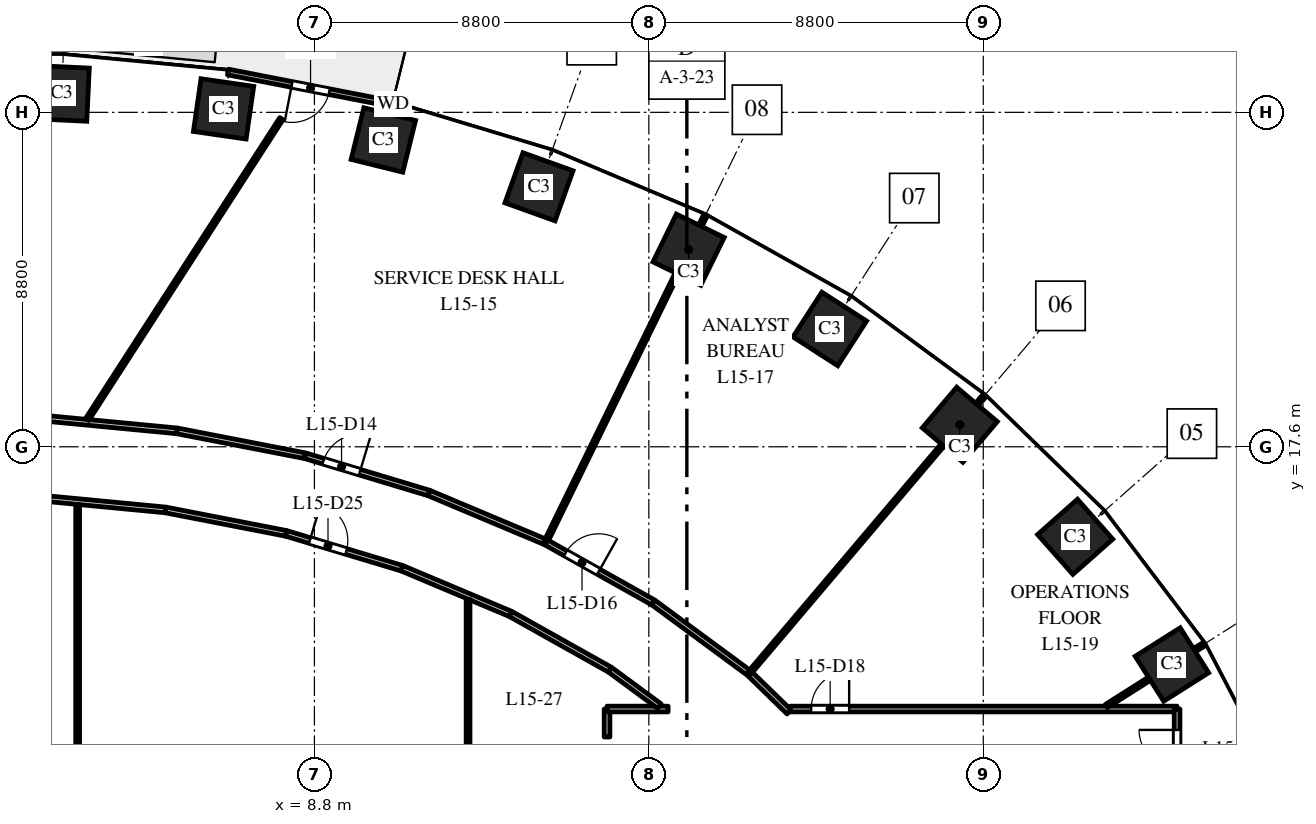
"""IFC4 building model, lengths in metres.
Left out: names, types, materials, properties, quantities, classifications, styles, units other than length and angle.
Written with IfcOpenShell. Run it as: python <this file> out.ifc"""

import sys

from ifc_helpers import new_model, si_unit, direction, frame, frame_2d, origin, origin_2d, place, context, subcontext, project, spatial, rectangle, extrude, element, fill, save


model = new_model("IFC4")
c1 = context("Model", 3, precision=1e-05, world=origin(), true_north=direction((0.0, 1.0)))
c2 = subcontext(c1, "Body", "Model", "MODEL_VIEW")
j1 = project(units=[si_unit("LENGTHUNIT", "METRE"), si_unit("PLANEANGLEUNIT", "RADIAN")], contexts=[c1])
p1 = place(None, origin())
s1 = spatial("IfcSite", under=j1, at=p1, CompositionType="ELEMENT")
p2 = place(p1, origin())
s2 = spatial("IfcBuilding", under=s1, at=p2, CompositionType="ELEMENT")
p3 = place(p2, frame((0.0, 0.0, 70.5)))
s3 = spatial("IfcBuildingStorey", under=s2, at=p3, CompositionType="ELEMENT", Elevation=70.5)
for number, where, z_axis, x_axis in (
    (1, (31.365, 11.871, 0.0), (0.0, 0.0, 1.0), (-0.535, 0.845, 0.0)),
    (2, (28.819, 15.23, 0.0), (0.0, 0.0, 1.0), (-0.663, 0.749, 0.0)),
    (3, (25.783, 18.18, 0.0), (0.0, 0.0, 1.0), (-0.763, 0.646, 0.0)),
    (4, (22.362, 20.7, 0.0), (0.0, 0.0, 1.0), (-0.84, 0.542, 0.0)),
    (5, (18.646, 22.785, 0.0), (0.0, 0.0, 1.0), (-0.898, 0.439, 0.0)),
    (6, (14.709, 24.441, 0.0), (0.0, 0.0, 1.0), (-0.941, 0.338, 0.0)),
    (7, (10.613, 25.674, 0.0), (0.0, 0.0, 1.0), (-0.971, 0.24, 0.0)),
    (8, (6.409, 26.491, 0.0), (0.0, 0.0, 1.0), (-0.99, 0.143, 0.0)),
    (9, (2.143, 26.898, 0.0), (0.0, 0.0, 1.0), (-0.999, 0.048, 0.0)),
):
    element("IfcColumn", number, at=place(p3, frame(where, z_axis=z_axis, x_axis=x_axis)), inside=s3, PredefinedType="COLUMN", context=c2, shape_type="SweptSolid", body=[
        extrude(rectangle(XDim=1.4, YDim=1.4, at=origin_2d()), origin(), (0.0, 0.0, 1.0), 4.0),
    ])
p4 = place(p3, frame((10.871, 26.617, 0.0), z_axis=(0.0, 0.0, 1.0), x_axis=(-0.981631174778, 0.190788460615, 0.0)))
e10 = element("IfcWall", 10, at=p4, inside=s3, PredefinedType="STANDARD", context=c2, shape_type="SweptSolid", body=[
    extrude(rectangle(XDim=4.426, YDim=0.15, at=frame_2d((2.213, 0.0))), origin(), (0.0, 0.0, 1.0), 3.7),
])
p5 = place(p4, frame((1.713, 0.0, 0.0)))
e11 = element("IfcOpeningElement", 11, at=p5, cuts=e10, PredefinedType="OPENING", context=c2, shape_type="SweptSolid", body=[
    extrude(rectangle(XDim=1.0, YDim=2.4, at=frame_2d((0.5, 1.2))), frame((0.0, 0.085, 0.0), z_axis=(0.0, -1.0, 0.0), x_axis=(1.0, 0.0, 0.0)), (0.0, 0.0, 1.0), 0.17),
])
p6 = place(p3, frame((1.636, 16.248, 0.0), z_axis=(0.0, 0.0, 1.0), x_axis=(0.99547459835, -0.095028017131, 0.0)))
e12 = element("IfcWall", 12, at=p6, inside=s3, PredefinedType="PARTITIONING", context=c2, shape_type="SweptSolid", body=[
    extrude(rectangle(XDim=3.263, YDim=0.15, at=frame_2d((1.631, 0.0))), origin(), (0.0, 0.0, 1.0), 2.85),
])
p7 = place(p3, frame((1.756, 18.346, 0.0), z_axis=(0.0, 0.0, 1.0), x_axis=(0.99548367506, -0.094932885187, 0.0)))
e13 = element("IfcWall", 13, at=p7, inside=s3, PredefinedType="PARTITIONING", context=c2, shape_type="SweptSolid", body=[
    extrude(rectangle(XDim=3.444, YDim=0.15, at=frame_2d((1.722, 0.0))), origin(), (0.0, 0.0, 1.0), 2.85),
])
p8 = place(p3, frame((2.569, 7.161, 0.0), z_axis=(0.0, 0.0, 1.0), x_axis=(0.0, 1.0, 0.0)))
e14 = element("IfcWall", 14, at=p8, inside=s3, PredefinedType="PARTITIONING", context=c2, shape_type="SweptSolid", body=[
    extrude(rectangle(XDim=8.919, YDim=0.1, at=frame_2d((4.459, 0.0))), origin(), (0.0, 0.0, 1.0), 2.85),
])
p9 = place(p3, frame((2.822, 18.32, 0.0), z_axis=(0.0, 0.0, 1.0), x_axis=(0.542318130681, 0.840173223291, 0.0)))
e15 = element("IfcWall", 15, at=p9, inside=s3, PredefinedType="PARTITIONING", context=c2, shape_type="SweptSolid", body=[
    extrude(rectangle(XDim=9.42, YDim=0.1, at=frame_2d((4.71, 0.0))), origin(), (0.0, 0.0, 1.0), 2.85),
])
p10 = place(p3, frame((4.884, 15.938, 0.0), z_axis=(0.0, 0.0, 1.0), x_axis=(0.981604377859, -0.190926282547, 0.0)))
e16 = element("IfcWall", 16, at=p10, inside=s3, PredefinedType="PARTITIONING", context=c2, shape_type="SweptSolid", body=[
    extrude(rectangle(XDim=3.231, YDim=0.15, at=frame_2d((1.616, 0.0))), origin(), (0.0, 0.0, 1.0), 3.7),
])
p11 = place(p3, frame((5.184, 18.019, 0.0), z_axis=(0.0, 0.0, 1.0), x_axis=(0.981650299947, -0.190690032812, 0.0)))
e17 = element("IfcWall", 17, at=p11, inside=s3, PredefinedType="PARTITIONING", context=c2, shape_type="SweptSolid", body=[
    extrude(rectangle(XDim=3.42, YDim=0.15, at=frame_2d((1.71, 0.0))), origin(), (0.0, 0.0, 1.0), 3.7),
])
p12 = place(p3, frame((8.056, 15.321, 0.0), z_axis=(0.0, 0.0, 1.0), x_axis=(0.957612601062, -0.28805920622, 0.0)))
e18 = element("IfcWall", 18, at=p12, inside=s3, PredefinedType="PARTITIONING", context=c2, shape_type="SweptSolid", body=[
    extrude(rectangle(XDim=3.18, YDim=0.15, at=frame_2d((1.59, 0.0))), origin(), (0.0, 0.0, 1.0), 2.85),
])
p13 = place(p12, frame((0.65, 0.0, 0.0)))
e19 = element("IfcOpeningElement", 19, at=p13, cuts=e18, PredefinedType="OPENING", context=c2, shape_type="SweptSolid", body=[
    extrude(rectangle(XDim=1.0, YDim=2.1, at=frame_2d((0.5, 1.05))), frame((0.0, 0.085, 0.0), z_axis=(0.0, -1.0, 0.0), x_axis=(1.0, 0.0, 0.0)), (0.0, 0.0, 1.0), 0.17),
])
p14 = place(p3, frame((8.56, 17.363, 0.0), z_axis=(0.0, 0.0, 1.0), x_axis=(0.95754884035, -0.28827108482, 0.0)))
e20 = element("IfcWall", 20, at=p14, inside=s3, PredefinedType="PARTITIONING", context=c2, shape_type="SweptSolid", body=[
    extrude(rectangle(XDim=3.396, YDim=0.15, at=frame_2d((1.698, 0.0))), origin(), (0.0, 0.0, 1.0), 2.85),
])
p15 = place(p14, frame((0.496, 0.0, 0.0)))
e21 = element("IfcOpeningElement", 21, at=p15, cuts=e20, PredefinedType="OPENING", context=c2, shape_type="SweptSolid", body=[
    extrude(rectangle(XDim=1.0, YDim=2.1, at=frame_2d((0.5, 1.05))), frame((0.0, 0.085, 0.0), z_axis=(0.0, -1.0, 0.0), x_axis=(1.0, 0.0, 0.0)), (0.0, 0.0, 1.0), 0.17),
])
p16 = place(p3, frame((11.101, 14.405, 0.0), z_axis=(0.0, 0.0, 1.0), x_axis=(0.921753827375, -0.387775555857, 0.0)))
e22 = element("IfcWall", 22, at=p16, inside=s3, PredefinedType="PARTITIONING", context=c2, shape_type="SweptSolid", body=[
    extrude(rectangle(XDim=3.103, YDim=0.15, at=frame_2d((1.551, 0.0))), origin(), (0.0, 0.0, 1.0), 3.7),
])
p17 = place(p3, frame((11.812, 16.384, 0.0), z_axis=(0.0, 0.0, 1.0), x_axis=(0.921839278558, -0.387572373252, 0.0)))
e23 = element("IfcWall", 23, at=p17, inside=s3, PredefinedType="PARTITIONING", context=c2, shape_type="SweptSolid", body=[
    extrude(rectangle(XDim=3.333, YDim=0.15, at=frame_2d((1.667, 0.0))), origin(), (0.0, 0.0, 1.0), 3.7),
])
p18 = place(p3, frame((12.843, -13.587, 0.0), z_axis=(0.0, 0.0, 1.0), x_axis=(0.0, 1.0, 0.0)))
e24 = element("IfcWall", 24, at=p18, inside=s3, PredefinedType="PARTITIONING", context=c2, shape_type="SweptSolid", body=[
    extrude(rectangle(XDim=27.174, YDim=0.1, at=frame_2d((13.587, 0.0))), origin(), (0.0, 0.0, 1.0), 2.75),
])
p19 = place(p3, frame((13.961, 13.202, 0.0), z_axis=(0.0, 0.0, 1.0), x_axis=(0.872164226045, -0.489213207924, 0.0)))
e25 = element("IfcWall", 25, at=p19, inside=s3, PredefinedType="PARTITIONING", context=c2, shape_type="SweptSolid", body=[
    extrude(rectangle(XDim=2.998, YDim=0.15, at=frame_2d((1.499, 0.0))), origin(), (0.0, 0.0, 1.0), 3.7),
])
p20 = place(p3, frame((14.887, 15.096, 0.0), z_axis=(0.0, 0.0, 1.0), x_axis=(0.439197765869, 0.89839040648, 0.0)))
e26 = element("IfcWall", 26, at=p20, inside=s3, PredefinedType="PARTITIONING", context=c2, shape_type="SweptSolid", body=[
    extrude(rectangle(XDim=9.561, YDim=0.1, at=frame_2d((4.78, 0.0))), origin(), (0.0, 0.0, 1.0), 2.85),
])
p21 = place(p3, frame((14.902, 15.082, 0.0), z_axis=(0.0, 0.0, 1.0), x_axis=(0.872144615544, -0.489248167679, 0.0)))
e27 = element("IfcWall", 27, at=p21, inside=s3, PredefinedType="PARTITIONING", context=c2, shape_type="SweptSolid", body=[
    extrude(rectangle(XDim=3.228, YDim=0.15, at=frame_2d((1.614, 0.0))), origin(), (0.0, 0.0, 1.0), 3.7),
])
p22 = place(p21, frame((0.578, 0.0, 0.0)))
e28 = element("IfcOpeningElement", 28, at=p22, cuts=e27, PredefinedType="OPENING", context=c2, shape_type="SweptSolid", body=[
    extrude(rectangle(XDim=1.0, YDim=2.1, at=frame_2d((0.5, 1.05))), frame((0.0, 0.085, 0.0), z_axis=(0.0, -1.0, 0.0), x_axis=(1.0, 0.0, 0.0)), (0.0, 0.0, 1.0), 0.17),
])
p23 = place(p3, frame((16.5, 9.964, 0.0), z_axis=(0.0, 0.0, 1.0), x_axis=(0.0, 1.0, 0.0)))
e29 = element("IfcWall", 29, at=p23, inside=s3, PredefinedType="PARTITIONING", context=c2, shape_type="SweptSolid", body=[
    extrude(rectangle(XDim=0.736, YDim=0.15, at=frame_2d((0.368, 0.0))), origin(), (0.0, 0.0, 1.0), 3.7),
])
p24 = place(p3, frame((16.5, 10.7, 0.0), z_axis=(0.0, 0.0, 1.0), x_axis=(1.0, 0.0, 0.0)))
e30 = element("IfcWall", 30, at=p24, inside=s3, PredefinedType="PARTITIONING", context=c2, shape_type="SweptSolid", body=[
    extrude(rectangle(XDim=1.607, YDim=0.15, at=frame_2d((0.803, 0.0))), origin(), (0.0, 0.0, 1.0), 3.7),
])
p25 = place(p3, frame((16.576, 11.735, 0.0), z_axis=(0.0, 0.0, 1.0), x_axis=(0.805021714708, -0.593245344566, 0.0)))
e31 = element("IfcWall", 31, at=p25, inside=s3, PredefinedType="PARTITIONING", context=c2, shape_type="SweptSolid", body=[
    extrude(rectangle(XDim=1.619, YDim=0.15, at=frame_2d((0.809, 0.0))), origin(), (0.0, 0.0, 1.0), 3.7),
])
p26 = place(p3, frame((17.717, 13.503, 0.0), z_axis=(0.0, 0.0, 1.0), x_axis=(0.805106688633, -0.593130019404, 0.0)))
e32 = element("IfcWall", 32, at=p26, inside=s3, PredefinedType="PARTITIONING", context=c2, shape_type="SweptSolid", body=[
    extrude(rectangle(XDim=3.137, YDim=0.15, at=frame_2d((1.569, 0.0))), origin(), (0.0, 0.0, 1.0), 3.7),
])
p27 = place(p3, frame((20.245, 11.645, 0.0), z_axis=(0.0, 0.0, 1.0), x_axis=(0.646420249139, 0.762981560395, 0.0)))
e33 = element("IfcWall", 33, at=p27, inside=s3, PredefinedType="PARTITIONING", context=c2, shape_type="SweptSolid", body=[
    extrude(rectangle(XDim=9.568, YDim=0.1, at=frame_2d((4.784, 0.0))), origin(), (0.0, 0.0, 1.0), 2.85),
])
p28 = place(p3, frame((20.257, 11.628, 0.0), z_axis=(0.0, 0.0, 1.0), x_axis=(0.717129161976, -0.696940288005, 0.0)))
e34 = element("IfcWall", 34, at=p28, inside=s3, PredefinedType="PARTITIONING", context=c2, shape_type="SweptSolid", body=[
    extrude(rectangle(XDim=1.439, YDim=0.15, at=frame_2d((0.719, 0.0))), origin(), (0.0, 0.0, 1.0), 2.75),
])
p29 = place(p3, frame((21.32, 10.7, 0.0), z_axis=(0.0, 0.0, 1.0), x_axis=(1.0, 0.0, 0.0)))
e35 = element("IfcWall", 35, at=p29, inside=s3, PredefinedType="PARTITIONING", context=c2, shape_type="SweptSolid", body=[
    extrude(rectangle(XDim=10.18, YDim=0.15, at=frame_2d((5.09, 0.0))), origin(), (0.0, 0.0, 1.0), 2.85),
])
p30 = place(p29, frame((0.551, 0.0, 0.0)))
e36 = element("IfcOpeningElement", 36, at=p30, cuts=e35, PredefinedType="OPENING", context=c2, shape_type="SweptSolid", body=[
    extrude(rectangle(XDim=1.0, YDim=2.1, at=frame_2d((0.5, 1.05))), frame((0.0, 0.085, 0.0), z_axis=(0.0, -1.0, 0.0), x_axis=(1.0, 0.0, 0.0)), (0.0, 0.0, 1.0), 0.17),
])
p31 = place(p3, frame((29.637, 10.777, 0.0), z_axis=(0.0, 0.0, 1.0), x_axis=(0.844810627195, 0.535065420467, 0.0)))
e37 = element("IfcWall", 37, at=p31, inside=s3, PredefinedType="PARTITIONING", context=c2, shape_type="SweptSolid", body=[
    extrude(rectangle(XDim=3.048, YDim=0.1, at=frame_2d((1.524, 0.0))), origin(), (0.0, 0.0, 1.0), 2.85),
])
p32 = place(p3, frame((31.5, 8.5, 0.0), z_axis=(0.0, 0.0, 1.0), x_axis=(0.0, 1.0, 0.0)))
e38 = element("IfcWall", 38, at=p32, inside=s3, PredefinedType="PARTITIONING", context=c2, shape_type="SweptSolid", body=[
    extrude(rectangle(XDim=2.2, YDim=0.15, at=frame_2d((1.1, 0.0))), origin(), (0.0, 0.0, 1.0), 2.85),
])
p33 = place(p32, frame((0.65, 0.0, 0.0)))
e39 = element("IfcOpeningElement", 39, at=p33, cuts=e38, PredefinedType="OPENING", context=c2, shape_type="SweptSolid", body=[
    extrude(rectangle(XDim=1.0, YDim=2.1, at=frame_2d((0.5, 1.05))), frame((0.0, 0.085, 0.0), z_axis=(0.0, -1.0, 0.0), x_axis=(1.0, 0.0, 0.0)), (0.0, 0.0, 1.0), 0.17),
])
p34 = place(p5, origin())
e40 = element("IfcDoor", 40, at=p34, inside=s3, OperationType="SINGLE_SWING_RIGHT", PredefinedType="DOOR", context=c2, shape_type="SweptSolid", body=[
    extrude(rectangle(XDim=1.0, YDim=2.4, at=frame_2d((0.5, 1.2))), frame((0.0, 0.025, 0.0), z_axis=(0.0, -1.0, 0.0), x_axis=(1.0, 0.0, 0.0)), (0.0, 0.0, 1.0), 0.05),
])
fill(e11, e40)
p35 = place(p15, origin())
e41 = element("IfcDoor", 41, at=p35, inside=s3, OperationType="SINGLE_SWING_RIGHT", PredefinedType="DOOR", context=c2, shape_type="SweptSolid", body=[
    extrude(rectangle(XDim=1.0, YDim=2.1, at=frame_2d((0.5, 1.05))), frame((0.0, 0.025, 0.0), z_axis=(0.0, -1.0, 0.0), x_axis=(1.0, 0.0, 0.0)), (0.0, 0.0, 1.0), 0.05),
])
fill(e21, e41)
p36 = place(p22, origin())
e42 = element("IfcDoor", 42, at=p36, inside=s3, OperationType="SINGLE_SWING_RIGHT", PredefinedType="DOOR", context=c2, shape_type="SweptSolid", body=[
    extrude(rectangle(XDim=1.0, YDim=2.1, at=frame_2d((0.5, 1.05))), frame((0.0, 0.025, 0.0), z_axis=(0.0, -1.0, 0.0), x_axis=(1.0, 0.0, 0.0)), (0.0, 0.0, 1.0), 0.05),
])
fill(e28, e42)
p37 = place(p30, origin())
e43 = element("IfcDoor", 43, at=p37, inside=s3, OperationType="SINGLE_SWING_RIGHT", PredefinedType="DOOR", context=c2, shape_type="SweptSolid", body=[
    extrude(rectangle(XDim=1.0, YDim=2.1, at=frame_2d((0.5, 1.05))), frame((0.0, 0.025, 0.0), z_axis=(0.0, -1.0, 0.0), x_axis=(1.0, 0.0, 0.0)), (0.0, 0.0, 1.0), 0.05),
])
fill(e36, e43)
p38 = place(p33, origin())
e44 = element("IfcDoor", 44, at=p38, inside=s3, OperationType="SINGLE_SWING_RIGHT", PredefinedType="DOOR", context=c2, shape_type="SweptSolid", body=[
    extrude(rectangle(XDim=1.0, YDim=2.1, at=frame_2d((0.5, 1.05))), frame((0.0, 0.025, 0.0), z_axis=(0.0, -1.0, 0.0), x_axis=(1.0, 0.0, 0.0)), (0.0, 0.0, 1.0), 0.05),
])
fill(e39, e44)
p39 = place(p13, origin())
e45 = element("IfcDoor", 45, at=p39, inside=s3, OperationType="SINGLE_SWING_LEFT", PredefinedType="DOOR", context=c2, shape_type="SweptSolid", body=[
    extrude(rectangle(XDim=1.0, YDim=2.1, at=frame_2d((0.5, 1.05))), frame((0.0, 0.025, 0.0), z_axis=(0.0, -1.0, 0.0), x_axis=(1.0, 0.0, 0.0)), (0.0, 0.0, 1.0), 0.05),
])
fill(e19, e45)
save(model, sys.argv[1])
